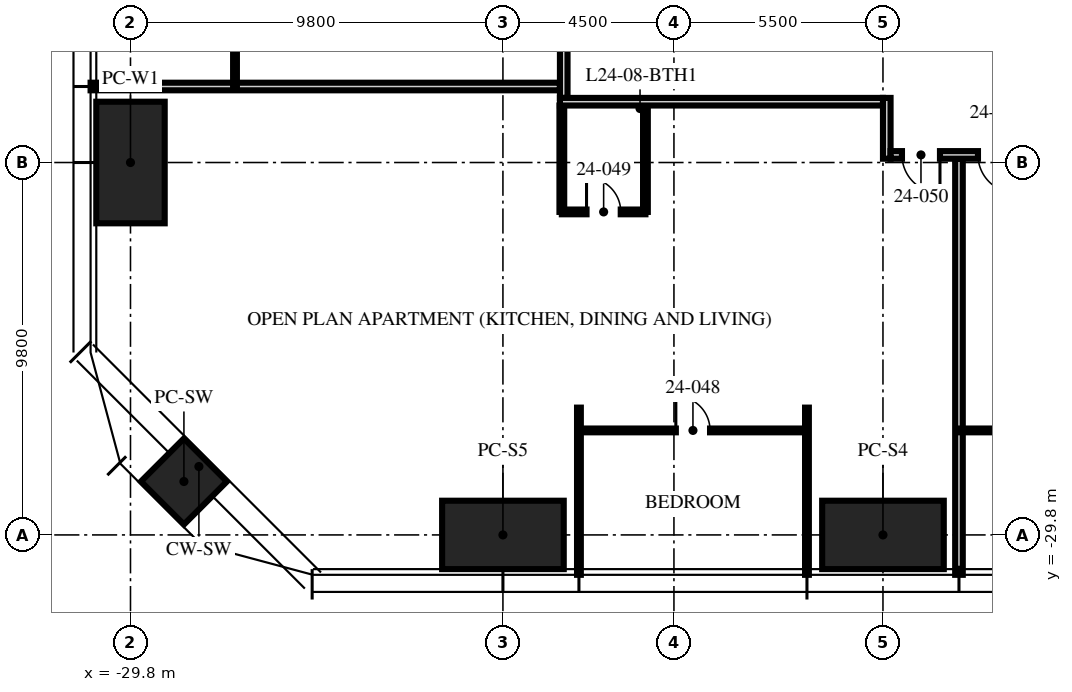
"""IFC4 building model, lengths in metres.
Left out: names, types, materials, properties, quantities, classifications, styles, units other than length and angle.
Written with IfcOpenShell. Run it as: python <this file> out.ifc"""

import sys

from ifc_helpers import new_model, si_unit, direction, frame, frame_2d, origin, origin_2d, place, context, subcontext, project, spatial, rectangle, hollow_rectangle, extrude, element, fill, save


model = new_model("IFC4")
c1 = context("Model", 3, precision=1e-05, world=origin(), true_north=direction((0.0, 1.0)))
c2 = subcontext(c1, "Body", "Model", "MODEL_VIEW")
j1 = project(units=[si_unit("LENGTHUNIT", "METRE"), si_unit("PLANEANGLEUNIT", "RADIAN")], contexts=[c1])
p1 = place(None, origin())
s1 = spatial("IfcSite", under=j1, at=p1, CompositionType="ELEMENT")
p2 = place(p1, origin())
s2 = spatial("IfcBuilding", under=s1, at=p2, CompositionType="ELEMENT")
p3 = place(p2, frame((0.0, 0.0, 96.0)))
s3 = spatial("IfcBuildingStorey", under=s2, at=p3, CompositionType="ELEMENT", Elevation=96.0)
p4 = place(p3, frame((-10.0, -29.8, 0.0), z_axis=(0.0, 0.0, 1.0), x_axis=(1.0, 0.0, 0.0)))
e1 = element("IfcColumn", 1, at=p4, inside=s3, PredefinedType="COLUMN", context=c2, shape_type="SweptSolid", body=[
    extrude(hollow_rectangle(XDim=3.2, YDim=1.8, WallThickness=0.2, at=origin_2d()), origin(), (0.0, 0.0, 1.0), 2.62),
])
for number, where, z_axis, x_axis in (
    (2, (-20.0, -29.8, 0.0), (0.0, 0.0, 1.0), (1.0, 0.0, 0.0)),
    (3, (-29.8, -20.0, 0.0), (0.0, 0.0, 1.0), (0.0, 1.0, 0.0)),
):
    element("IfcColumn", number, at=place(p3, frame(where, z_axis=z_axis, x_axis=x_axis)), inside=s3, PredefinedType="COLUMN", context=c2, shape_type="SweptSolid", body=[
        extrude(hollow_rectangle(XDim=3.2, YDim=1.8, WallThickness=0.2, at=origin_2d()), origin(), (0.0, 0.0, 1.0), 2.47),
    ])
p5 = place(p3, frame((-28.394, -28.394, 0.0), z_axis=(0.0, 0.0, 1.0), x_axis=(0.707106781187, -0.707106781187, 0.0)))
e4 = element("IfcColumn", 4, at=p5, inside=s3, PredefinedType="COLUMN", context=c2, shape_type="SweptSolid", body=[
    extrude(hollow_rectangle(XDim=1.6, YDim=1.6, WallThickness=0.1, at=origin_2d()), origin(), (0.0, 0.0, 1.0), 2.74),
])
p6 = place(p3, frame((-18.5, -18.0, 0.0), z_axis=(0.0, 0.0, 1.0), x_axis=(-1.0, 0.0, 0.0)))
e5 = element("IfcWall", 5, at=p6, inside=s3, PredefinedType="PARTITIONING", context=c2, shape_type="SweptSolid", body=[
    extrude(rectangle(XDim=12.35, YDim=0.2, at=frame_2d((6.175, 0.0))), origin(), (0.0, 0.0, 1.0), 2.3),
])
for number, where, z_axis, x_axis in (
    (6, (-18.0, -26.45, 0.0), (0.0, 0.0, 1.0), (0.0, -1.0, 0.0)),
    (7, (-12.0, -26.45, 0.0), (0.0, 0.0, 1.0), (0.0, -1.0, 0.0)),
):
    element("IfcWall", number, at=place(p3, frame(where, z_axis=z_axis, x_axis=x_axis)), inside=s3, PredefinedType="PARTITIONING", context=c2, shape_type="SweptSolid", body=[
        extrude(rectangle(XDim=4.4, YDim=0.1, at=frame_2d((2.2, 0.0))), origin(), (0.0, 0.0, 1.0), 2.7),
    ])
p7 = place(p3, frame((-8.0, -19.9, 0.0), z_axis=(0.0, 0.0, 1.0), x_axis=(0.0, -1.0, 0.0)))
e8 = element("IfcWall", 8, at=p7, inside=s3, PredefinedType="PARTITIONING", context=c2, shape_type="SweptSolid", body=[
    extrude(rectangle(XDim=10.95, YDim=0.2, at=frame_2d((5.475, 0.0))), origin(), (0.0, 0.0, 1.0), 2.7),
])
p8 = place(p3, frame((-27.05, -12.0, 0.0), z_axis=(0.0, 0.0, 1.0), x_axis=(0.0, -1.0, 0.0)))
e9 = element("IfcWall", 9, at=p8, inside=s3, PredefinedType="PARTITIONING", context=c2, shape_type="SweptSolid", body=[
    extrude(rectangle(XDim=6.0, YDim=0.1, at=frame_2d((3.0, 0.0))), origin(), (0.0, 0.0, 1.0), 2.2),
])
p9 = place(p8, frame((2.55, 0.0, 0.0)))
e10 = element("IfcOpeningElement", 10, at=p9, cuts=e9, PredefinedType="OPENING", context=c2, shape_type="SweptSolid", body=[
    extrude(rectangle(XDim=0.9, YDim=2.1, at=frame_2d((0.45, 1.05))), frame((0.0, 0.06, 0.0), z_axis=(0.0, -1.0, 0.0), x_axis=(1.0, 0.0, 0.0)), (0.0, 0.0, 1.0), 0.12),
])
p10 = place(p3, frame((-18.0, -27.05, 0.0), z_axis=(0.0, 0.0, 1.0), x_axis=(1.0, 0.0, 0.0)))
e11 = element("IfcWall", 11, at=p10, inside=s3, PredefinedType="PARTITIONING", context=c2, shape_type="SweptSolid", body=[
    extrude(rectangle(XDim=6.0, YDim=0.1, at=frame_2d((3.0, 0.0))), origin(), (0.0, 0.0, 1.0), 2.2),
])
p11 = place(p10, frame((2.55, 0.0, 0.0)))
e12 = element("IfcOpeningElement", 12, at=p11, cuts=e11, PredefinedType="OPENING", context=c2, shape_type="SweptSolid", body=[
    extrude(rectangle(XDim=0.9, YDim=2.1, at=frame_2d((0.45, 1.05))), frame((0.0, 0.06, 0.0), z_axis=(0.0, -1.0, 0.0), x_axis=(1.0, 0.0, 0.0)), (0.0, 0.0, 1.0), 0.12),
])
p12 = place(p3, frame((-18.45, -21.3, 0.0), z_axis=(0.0, 0.0, 1.0), x_axis=(1.0, 0.0, 0.0)))
e13 = element("IfcWall", 13, at=p12, inside=s3, PredefinedType="PARTITIONING", context=c2, shape_type="SweptSolid", body=[
    extrude(rectangle(XDim=2.2, YDim=0.125, at=frame_2d((1.1, 0.0))), origin(), (0.0, 0.0, 1.0), 3.4),
])
p13 = place(p12, frame((0.65, 0.0, 0.0)))
e14 = element("IfcOpeningElement", 14, at=p13, cuts=e13, PredefinedType="OPENING", context=c2, shape_type="SweptSolid", body=[
    extrude(rectangle(XDim=0.9, YDim=2.1, at=frame_2d((0.45, 1.05))), frame((0.0, 0.073, 0.0), z_axis=(0.0, -1.0, 0.0), x_axis=(1.0, 0.0, 0.0)), (0.0, 0.0, 1.0), 0.145),
])
p14 = place(p3, frame((-18.45, -18.5, 0.0), z_axis=(0.0, 0.0, 1.0), x_axis=(0.0, -1.0, 0.0)))
e15 = element("IfcWall", 15, at=p14, inside=s3, PredefinedType="PARTITIONING", context=c2, shape_type="SweptSolid", body=[
    extrude(rectangle(XDim=2.8, YDim=0.125, at=frame_2d((1.4, 0.0))), origin(), (0.0, 0.0, 1.0), 2.3),
])
p15 = place(p3, frame((-16.25, -18.5, 0.0), z_axis=(0.0, 0.0, 1.0), x_axis=(0.0, -1.0, 0.0)))
e16 = element("IfcWall", 16, at=p15, inside=s3, PredefinedType="PARTITIONING", context=c2, shape_type="SweptSolid", body=[
    extrude(rectangle(XDim=2.8, YDim=0.125, at=frame_2d((1.4, 0.0))), origin(), (0.0, 0.0, 1.0), 3.4),
])
p16 = place(p3, frame((-8.0, -27.05, 0.0), z_axis=(0.0, 0.0, 1.0), x_axis=(1.0, 0.0, 0.0)))
e17 = element("IfcWall", 17, at=p16, inside=s3, PredefinedType="PARTITIONING", context=c2, shape_type="SweptSolid", body=[
    extrude(rectangle(XDim=6.0, YDim=0.1, at=frame_2d((3.0, 0.0))), origin(), (0.0, 0.0, 1.0), 2.2),
])
p17 = place(p16, frame((2.55, 0.0, 0.0)))
e18 = element("IfcOpeningElement", 18, at=p17, cuts=e17, PredefinedType="OPENING", context=c2, shape_type="SweptSolid", body=[
    extrude(rectangle(XDim=0.9, YDim=2.1, at=frame_2d((0.45, 1.05))), frame((0.0, 0.06, 0.0), z_axis=(0.0, -1.0, 0.0), x_axis=(1.0, 0.0, 0.0)), (0.0, 0.0, 1.0), 0.12),
])
p18 = place(p3, frame((-18.4, 0.0, 0.0), z_axis=(0.0, 0.0, 1.0), x_axis=(0.0, -1.0, 0.0)))
e19 = element("IfcWall", 19, at=p18, inside=s3, PredefinedType="PARTITIONING", context=c2, shape_type="SweptSolid", body=[
    extrude(rectangle(XDim=18.3, YDim=0.2, at=frame_2d((9.15, 0.0))), origin(), (0.0, 0.0, 1.0), 2.2),
])
p19 = place(p3, frame((-9.9, -18.3, 0.0), z_axis=(0.0, 0.0, 1.0), x_axis=(0.0, -1.0, 0.0)))
e20 = element("IfcWall", 20, at=p19, inside=s3, PredefinedType="PARTITIONING", context=c2, shape_type="SweptSolid", body=[
    extrude(rectangle(XDim=1.6, YDim=0.2, at=frame_2d((0.8, 0.0))), origin(), (0.0, 0.0, 1.0), 2.3),
])
p20 = place(p3, frame((-6.2, -19.8, 0.0), z_axis=(0.0, 0.0, 1.0), x_axis=(-1.0, 0.0, 0.0)))
e21 = element("IfcWall", 21, at=p20, inside=s3, PredefinedType="PARTITIONING", context=c2, shape_type="SweptSolid", body=[
    extrude(rectangle(XDim=3.6, YDim=0.2, at=frame_2d((1.8, 0.0))), origin(), (0.0, 0.0, 1.0), 2.3),
])
p21 = place(p20, frame((2.3, 0.0, 0.0)))
e22 = element("IfcOpeningElement", 22, at=p21, cuts=e21, PredefinedType="OPENING", context=c2, shape_type="SweptSolid", body=[
    extrude(rectangle(XDim=1.0, YDim=2.2, at=frame_2d((0.5, 1.1))), frame((0.0, 0.11, 0.0), z_axis=(0.0, -1.0, 0.0), x_axis=(1.0, 0.0, 0.0)), (0.0, 0.0, 1.0), 0.22),
])
p22 = place(p20, frame((0.3, 0.0, 0.0)))
e23 = element("IfcOpeningElement", 23, at=p22, cuts=e21, PredefinedType="OPENING", context=c2, shape_type="SweptSolid", body=[
    extrude(rectangle(XDim=1.0, YDim=2.2, at=frame_2d((0.5, 1.1))), frame((0.0, 0.11, 0.0), z_axis=(0.0, -1.0, 0.0), x_axis=(1.0, 0.0, 0.0)), (0.0, 0.0, 1.0), 0.22),
])
p23 = place(p3, frame((-10.0, -18.4, 0.0), z_axis=(0.0, 0.0, 1.0), x_axis=(-1.0, 0.0, 0.0)))
e24 = element("IfcWall", 24, at=p23, inside=s3, PredefinedType="PARTITIONING", context=c2, shape_type="SweptSolid", body=[
    extrude(rectangle(XDim=8.5, YDim=0.2, at=frame_2d((4.25, 0.0))), origin(), (0.0, 0.0, 1.0), 2.2),
])
p24 = place(p11, origin())
e25 = element("IfcDoor", 25, at=p24, inside=s3, OperationType="SINGLE_SWING_LEFT", PredefinedType="DOOR", context=c2, shape_type="SweptSolid", body=[
    extrude(rectangle(XDim=0.9, YDim=2.1, at=frame_2d((0.45, 1.05))), frame((0.0, 0.025, 0.0), z_axis=(0.0, -1.0, 0.0), x_axis=(1.0, 0.0, 0.0)), (0.0, 0.0, 1.0), 0.05),
])
fill(e12, e25)
p25 = place(p13, origin())
e26 = element("IfcDoor", 26, at=p25, inside=s3, OperationType="SINGLE_SWING_LEFT", PredefinedType="DOOR", context=c2, shape_type="SweptSolid", body=[
    extrude(rectangle(XDim=0.9, YDim=2.1, at=frame_2d((0.45, 1.05))), frame((0.0, 0.025, 0.0), z_axis=(0.0, -1.0, 0.0), x_axis=(1.0, 0.0, 0.0)), (0.0, 0.0, 1.0), 0.05),
])
fill(e14, e26)
p26 = place(p21, origin())
e27 = element("IfcDoor", 27, at=p26, inside=s3, OperationType="SINGLE_SWING_LEFT", PredefinedType="DOOR", context=c2, shape_type="SweptSolid", body=[
    extrude(rectangle(XDim=1.0, YDim=2.2, at=frame_2d((0.5, 1.1))), frame((0.0, 0.025, 0.0), z_axis=(0.0, -1.0, 0.0), x_axis=(1.0, 0.0, 0.0)), (0.0, 0.0, 1.0), 0.05),
])
fill(e22, e27)
p27 = place(p22, origin())
e28 = element("IfcDoor", 28, at=p27, inside=s3, OperationType="SINGLE_SWING_LEFT", PredefinedType="DOOR", context=c2, shape_type="SweptSolid", body=[
    extrude(rectangle(XDim=1.0, YDim=2.2, at=frame_2d((0.5, 1.1))), frame((0.0, 0.025, 0.0), z_axis=(0.0, -1.0, 0.0), x_axis=(1.0, 0.0, 0.0)), (0.0, 0.0, 1.0), 0.05),
])
fill(e23, e28)
save(model, sys.argv[1])
